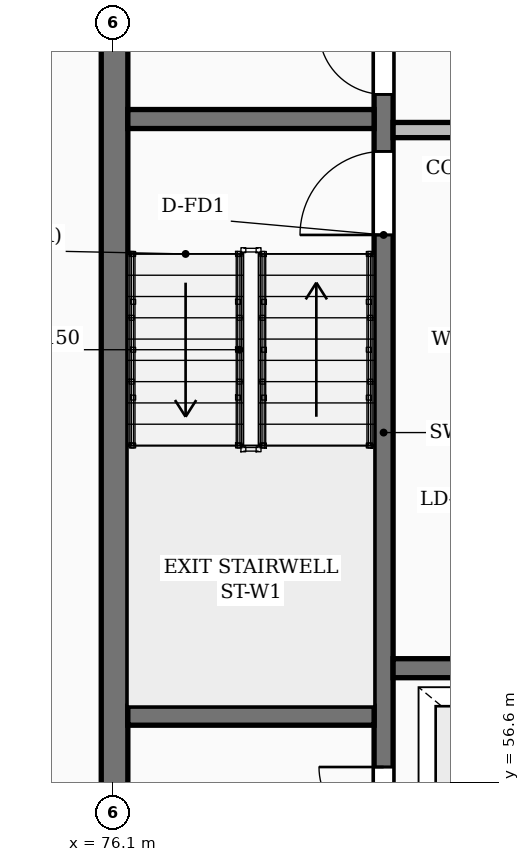
"""IFC4 building model, lengths in metres.
Left out: names, types, materials, properties, quantities, classifications, styles, units other than length and angle.
Written with IfcOpenShell. Run it as: python <this file> out.ifc"""

import sys

from ifc_helpers import new_model, si_unit, direction, frame, frame_2d, origin, place, context, subcontext, project, spatial, rectangle, extrude, element, fill, save


model = new_model("IFC4")
c1 = context("Model", 3, precision=1e-05, world=origin(), true_north=direction((0.0, 1.0)))
c2 = subcontext(c1, "Body", "Model", "MODEL_VIEW")
j1 = project(units=[si_unit("LENGTHUNIT", "METRE"), si_unit("PLANEANGLEUNIT", "RADIAN")], contexts=[c1])
p1 = place(None, origin())
s1 = spatial("IfcSite", under=j1, at=p1, CompositionType="ELEMENT")
p2 = place(p1, origin())
s2 = spatial("IfcBuilding", under=s1, at=p2, CompositionType="ELEMENT")
p3 = place(p2, frame((0.0, 0.0, -10.8)))
s3 = spatial("IfcBuildingStorey", under=s2, at=p3, CompositionType="ELEMENT", Elevation=-10.8)
p4 = place(p3, frame((76.125, 55.375, 0.0), z_axis=(0.0, 0.0, 1.0), x_axis=(0.0, 1.0, 0.0)))
e1 = element("IfcWall", 1, at=p4, inside=s3, PredefinedType="SHEAR", context=c2, shape_type="SweptSolid", body=[
    extrude(rectangle(XDim=11.65, YDim=0.35, at=frame_2d((5.825, 0.0))), origin(), (0.0, 0.0, 1.0), 3.6),
])
p5 = place(p3, frame((79.665, 55.4, 0.0), z_axis=(0.0, 0.0, 1.0), x_axis=(0.0, 1.0, 0.0)))
e2 = element("IfcWall", 2, at=p5, inside=s3, PredefinedType="SHEAR", context=c2, shape_type="SweptSolid", body=[
    extrude(rectangle(XDim=11.6, YDim=0.25, at=frame_2d((5.8, 0.0))), origin(), (0.0, 0.0, 1.0), 3.6),
])
p6 = place(p5, frame((0.55, 0.0, 0.0)))
e3 = element("IfcOpeningElement", 3, at=p6, cuts=e2, PredefinedType="OPENING", context=c2, shape_type="SweptSolid", body=[
    extrude(rectangle(XDim=0.85, YDim=2.05, at=frame_2d((0.425, 1.025))), frame((0.0, 0.135, 0.0), z_axis=(0.0, -1.0, 0.0), x_axis=(1.0, 0.0, 0.0)), (0.0, 0.0, 1.0), 0.27),
])
p7 = place(p5, frame((8.4, 0.0, 0.0)))
e4 = element("IfcOpeningElement", 4, at=p7, cuts=e2, PredefinedType="OPENING", context=c2, shape_type="SweptSolid", body=[
    extrude(rectangle(XDim=1.1, YDim=2.1, at=frame_2d((0.55, 1.05))), frame((0.0, 0.135, 0.0), z_axis=(0.0, -1.0, 0.0), x_axis=(1.0, 0.0, 0.0)), (0.0, 0.0, 1.0), 0.27),
])
p8 = place(p5, frame((10.25, 0.0, 0.0)))
e5 = element("IfcOpeningElement", 5, at=p8, cuts=e2, PredefinedType="OPENING", context=c2, shape_type="SweptSolid", body=[
    extrude(rectangle(XDim=0.85, YDim=2.05, at=frame_2d((0.425, 1.025))), frame((0.0, 0.135, 0.0), z_axis=(0.0, -1.0, 0.0), x_axis=(1.0, 0.0, 0.0)), (0.0, 0.0, 1.0), 0.27),
])
for number, where, z_axis, x_axis in (
    (6, (76.3, 57.475, 0.0), (0.0, 0.0, 1.0), (1.0, 0.0, 0.0)),
    (7, (76.3, 65.325, 0.0), (0.0, 0.0, 1.0), (1.0, 0.0, 0.0)),
):
    element("IfcWall", number, at=place(p3, frame(where, z_axis=z_axis, x_axis=x_axis)), inside=s3, PredefinedType="SHEAR", context=c2, shape_type="SweptSolid", body=[
        extrude(rectangle(XDim=3.24, YDim=0.25, at=frame_2d((1.62, 0.0))), origin(), (0.0, 0.0, 1.0), 3.6),
    ])
p9 = place(p3, frame((79.79, 58.1, 0.0), z_axis=(0.0, 0.0, 1.0), x_axis=(1.0, 0.0, 0.0)))
e8 = element("IfcWall", 8, at=p9, inside=s3, PredefinedType="SHEAR", context=c2, shape_type="SweptSolid", body=[
    extrude(rectangle(XDim=4.39, YDim=0.25, at=frame_2d((2.195, 0.0))), origin(), (0.0, 0.0, 1.0), 3.6),
])
p10 = place(p9, frame((1.05, 0.0, 0.0)))
e9 = element("IfcOpeningElement", 9, at=p10, cuts=e8, PredefinedType="OPENING", context=c2, shape_type="SweptSolid", body=[
    extrude(rectangle(XDim=1.12, YDim=2.12, at=frame_2d((0.56, 1.06))), frame((0.0, 0.135, 0.0), z_axis=(0.0, -1.0, 0.0), x_axis=(1.0, 0.0, 0.0)), (0.0, 0.0, 1.0), 0.27),
])
p11 = place(p9, frame((3.26, 0.0, 0.0)))
e10 = element("IfcOpeningElement", 10, at=p11, cuts=e8, PredefinedType="OPENING", context=c2, shape_type="SweptSolid", body=[
    extrude(rectangle(XDim=0.85, YDim=2.05, at=frame_2d((0.425, 1.025))), frame((0.0, 0.135, 0.0), z_axis=(0.0, -1.0, 0.0), x_axis=(1.0, 0.0, 0.0)), (0.0, 0.0, 1.0), 0.27),
])
p12 = place(p3, frame((79.79, 65.18, 0.0), z_axis=(0.0, 0.0, 1.0), x_axis=(1.0, 0.0, 0.0)))
e11 = element("IfcWall", 11, at=p12, inside=s3, PredefinedType="PARTITIONING", context=c2, shape_type="SweptSolid", body=[
    extrude(rectangle(XDim=4.39, YDim=0.2, at=frame_2d((2.195, 0.0))), origin(), (0.0, 0.0, 1.0), 3.3),
])
p13 = place(p12, frame((1.5, 0.0, 0.0)))
e12 = element("IfcOpeningElement", 12, at=p13, cuts=e11, PredefinedType="OPENING", context=c2, shape_type="SweptSolid", body=[
    extrude(rectangle(XDim=1.1, YDim=2.1, at=frame_2d((0.55, 1.05))), frame((0.0, 0.11, 0.0), z_axis=(0.0, -1.0, 0.0), x_axis=(1.0, 0.0, 0.0)), (0.0, 0.0, 1.0), 0.22),
])
p14 = place(p6, origin())
e13 = element("IfcDoor", 13, at=p14, inside=s3, OperationType="SINGLE_SWING_RIGHT", PredefinedType="DOOR", context=c2, shape_type="SweptSolid", body=[
    extrude(rectangle(XDim=0.85, YDim=2.05, at=frame_2d((0.425, 1.025))), frame((0.0, 0.025, 0.0), z_axis=(0.0, -1.0, 0.0), x_axis=(1.0, 0.0, 0.0)), (0.0, 0.0, 1.0), 0.05),
])
fill(e3, e13)
p15 = place(p7, origin())
e14 = element("IfcDoor", 14, at=p15, inside=s3, OperationType="SINGLE_SWING_LEFT", PredefinedType="DOOR", context=c2, shape_type="SweptSolid", body=[
    extrude(rectangle(XDim=1.1, YDim=2.1, at=frame_2d((0.55, 1.05))), frame((0.0, 0.025, 0.0), z_axis=(0.0, -1.0, 0.0), x_axis=(1.0, 0.0, 0.0)), (0.0, 0.0, 1.0), 0.05),
])
fill(e4, e14)
p16 = place(p8, origin())
e15 = element("IfcDoor", 15, at=p16, inside=s3, OperationType="SINGLE_SWING_RIGHT", PredefinedType="DOOR", context=c2, shape_type="SweptSolid", body=[
    extrude(rectangle(XDim=0.85, YDim=2.05, at=frame_2d((0.425, 1.025))), frame((0.0, 0.025, 0.0), z_axis=(0.0, -1.0, 0.0), x_axis=(1.0, 0.0, 0.0)), (0.0, 0.0, 1.0), 0.05),
])
fill(e5, e15)
save(model, sys.argv[1])
